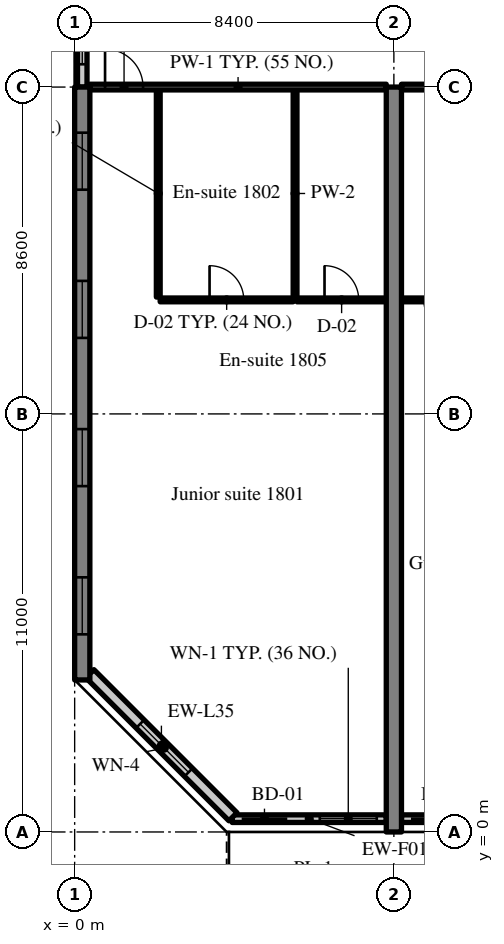
"""IFC4 building model, lengths in metres.
Left out: names, types, materials, properties, quantities, classifications, styles, units other than length and angle.
Written with IfcOpenShell. Run it as: python <this file> out.ifc"""

import sys

from ifc_helpers import new_model, si_unit, direction, frame, frame_2d, origin, place, context, subcontext, project, spatial, rectangle, extrude, source, transform, mapped, element, fill, save


model = new_model("IFC4")
c1 = context("Model", 3, precision=1e-05, world=origin(), true_north=direction((0.0, 1.0)))
c2 = subcontext(c1, "Body", "Model", "MODEL_VIEW")
j1 = project(units=[si_unit("LENGTHUNIT", "METRE"), si_unit("PLANEANGLEUNIT", "RADIAN")], contexts=[c1])
p1 = place(None, origin())
s1 = spatial("IfcSite", under=j1, at=p1, CompositionType="ELEMENT")
p2 = place(p1, origin())
s2 = spatial("IfcBuilding", under=s1, at=p2, CompositionType="ELEMENT")
p3 = place(p2, frame((0.0, 0.0, 77.2)))
s3 = spatial("IfcBuildingStorey", under=s2, at=p3, CompositionType="ELEMENT", Elevation=77.2)
m1 = source(origin(), c2, "Body", "SweptSolid", [
    extrude(rectangle(XDim=15.6, YDim=0.4, at=frame_2d((7.8, 0.0))), origin(), (0.0, 0.0, 1.0), 3.52),
])
p4 = place(p3, frame((0.2, 4.0, 0.0), z_axis=(0.0, 0.0, 1.0), x_axis=(0.0, 1.0, 0.0)))
e1 = element("IfcWall", 1, at=p4, inside=s3, PredefinedType="SHEAR", context=c2, shape_type="MappedRepresentation", body=[
    mapped(m1, transform((0.0, 0.0, 0.0), scale=1.0)),
])
m2 = source(origin(), c2, "Body", "SweptSolid", [
    extrude(rectangle(XDim=1.5, YDim=1.5, at=frame_2d((0.75, 0.75))), frame((0.0, 0.21, 0.0), z_axis=(0.0, -1.0, 0.0), x_axis=(1.0, 0.0, 0.0)), (0.0, 0.0, 1.0), 0.42),
])
p5 = place(p4, frame((1.2, 0.0, 0.9)))
e2 = element("IfcOpeningElement", 2, at=p5, cuts=e1, PredefinedType="OPENING", context=c2, shape_type="MappedRepresentation", body=[
    mapped(m2, transform((0.0, 0.0, 0.0), scale=1.0)),
])
p6 = place(p4, frame((5.1, 0.0, 0.9)))
e3 = element("IfcOpeningElement", 3, at=p6, cuts=e1, PredefinedType="OPENING", context=c2, shape_type="MappedRepresentation", body=[
    mapped(m2, transform((0.0, 0.0, 0.0), scale=1.0)),
])
p7 = place(p4, frame((9.0, 0.0, 0.9)))
e4 = element("IfcOpeningElement", 4, at=p7, cuts=e1, PredefinedType="OPENING", context=c2, shape_type="MappedRepresentation", body=[
    mapped(m2, transform((0.0, 0.0, 0.0), scale=1.0)),
])
p8 = place(p4, frame((12.9, 0.0, 0.9)))
e5 = element("IfcOpeningElement", 5, at=p8, cuts=e1, PredefinedType="OPENING", context=c2, shape_type="MappedRepresentation", body=[
    mapped(m2, transform((0.0, 0.0, 0.0), scale=1.0)),
])
m3 = source(origin(), c2, "Body", "SweptSolid", [
    extrude(rectangle(XDim=19.6, YDim=0.4, at=frame_2d((9.8, 0.0))), origin(), (0.0, 0.0, 1.0), 3.52),
])
p9 = place(p3, frame((8.4, 0.0, 0.0), z_axis=(0.0, 0.0, 1.0), x_axis=(0.0, 1.0, 0.0)))
e6 = element("IfcWall", 6, at=p9, inside=s3, PredefinedType="SHEAR", context=c2, shape_type="MappedRepresentation", body=[
    mapped(m3, transform((0.0, 0.0, 0.0), scale=1.0)),
])
m4 = source(origin(), c2, "Body", "SweptSolid", [
    extrude(rectangle(XDim=4.055, YDim=0.2, at=frame_2d((2.027, 0.0))), origin(), (0.0, 0.0, 1.0), 2.82),
])
p10 = place(p3, frame((4.145, 0.35, 0.0), z_axis=(0.0, 0.0, 1.0), x_axis=(1.0, 0.0, 0.0)))
e7 = element("IfcWall", 7, at=p10, inside=s3, PredefinedType="SOLIDWALL", context=c2, shape_type="MappedRepresentation", body=[
    mapped(m4, transform((0.0, 0.0, 0.0), scale=1.0)),
])
m5 = source(origin(), c2, "Body", "SweptSolid", [
    extrude(rectangle(XDim=1.2, YDim=2.4, at=frame_2d((0.6, 1.2))), frame((0.0, 0.11, 0.0), z_axis=(0.0, -1.0, 0.0), x_axis=(1.0, 0.0, 0.0)), (0.0, 0.0, 1.0), 0.22),
])
p11 = place(p10, frame((0.25, 0.0, 0.0)))
e8 = element("IfcOpeningElement", 8, at=p11, cuts=e7, PredefinedType="OPENING", context=c2, shape_type="MappedRepresentation", body=[
    mapped(m5, transform((0.0, 0.0, 0.0), scale=1.0)),
])
m6 = source(origin(), c2, "Body", "SweptSolid", [
    extrude(rectangle(XDim=1.5, YDim=1.5, at=frame_2d((0.75, 0.75))), frame((0.0, 0.11, 0.0), z_axis=(0.0, -1.0, 0.0), x_axis=(1.0, 0.0, 0.0)), (0.0, 0.0, 1.0), 0.22),
])
p12 = place(p10, frame((2.305, 0.0, 0.9)))
e9 = element("IfcOpeningElement", 9, at=p12, cuts=e7, PredefinedType="OPENING", context=c2, shape_type="MappedRepresentation", body=[
    mapped(m6, transform((0.0, 0.0, 0.0), scale=1.0)),
])
m7 = source(origin(), c2, "Body", "SweptSolid", [
    extrude(rectangle(XDim=3.6, YDim=0.2, at=frame_2d((1.8, 0.0))), origin(), (0.0, 0.0, 1.0), 2.82),
])
p13 = place(p3, frame((8.6, 0.35, 0.0), z_axis=(0.0, 0.0, 1.0), x_axis=(1.0, 0.0, 0.0)))
e10 = element("IfcWall", 10, at=p13, inside=s3, PredefinedType="SOLIDWALL", context=c2, shape_type="MappedRepresentation", body=[
    mapped(m7, transform((0.0, 0.0, 0.0), scale=1.0)),
])
p14 = place(p13, frame((0.25, 0.0, 0.0)))
e11 = element("IfcOpeningElement", 11, at=p14, cuts=e10, PredefinedType="OPENING", context=c2, shape_type="MappedRepresentation", body=[
    mapped(m5, transform((0.0, 0.0, 0.0), scale=1.0)),
])
p15 = place(p13, frame((1.85, 0.0, 0.9)))
e12 = element("IfcOpeningElement", 12, at=p15, cuts=e10, PredefinedType="OPENING", context=c2, shape_type="MappedRepresentation", body=[
    mapped(m6, transform((0.0, 0.0, 0.0), scale=1.0)),
])
m8 = source(origin(), c2, "Body", "SweptSolid", [
    extrude(rectangle(XDim=5.326, YDim=0.3, at=frame_2d((2.663, 0.0))), origin(), (0.0, 0.0, 1.0), 3.52),
])
p16 = place(p3, frame((0.4, 4.166, 0.0), z_axis=(0.0, 0.0, 1.0), x_axis=(0.707106781187, -0.707106781187, 0.0)))
e13 = element("IfcWall", 13, at=p16, inside=s3, PredefinedType="SOLIDWALL", context=c2, shape_type="MappedRepresentation", body=[
    mapped(m8, transform((0.0, 0.0, 0.0), scale=1.0)),
])
m9 = source(origin(), c2, "Body", "SweptSolid", [
    extrude(rectangle(XDim=1.8, YDim=1.5, at=frame_2d((0.9, 0.75))), frame((0.0, 0.16, 0.0), z_axis=(0.0, -1.0, 0.0), x_axis=(1.0, 0.0, 0.0)), (0.0, 0.0, 1.0), 0.32),
])
p17 = place(p16, frame((1.871, 0.0, 0.9)))
e14 = element("IfcOpeningElement", 14, at=p17, cuts=e13, PredefinedType="OPENING", context=c2, shape_type="MappedRepresentation", body=[
    mapped(m9, transform((0.0, 0.0, 0.0), scale=1.0)),
])
m10 = source(origin(), c2, "Body", "SweptSolid", [
    extrude(rectangle(XDim=2.4, YDim=0.25, at=frame_2d((1.2, 0.0))), origin(), (0.0, 0.0, 1.0), 2.62),
])
p18 = place(p3, frame((0.2, 19.6, 0.0), z_axis=(0.0, 0.0, 1.0), x_axis=(0.0, 1.0, 0.0)))
e15 = element("IfcWall", 15, at=p18, inside=s3, PredefinedType="SOLIDWALL", context=c2, shape_type="MappedRepresentation", body=[
    mapped(m10, transform((0.0, 0.0, 0.0), scale=1.0)),
])
m11 = source(origin(), c2, "Body", "SweptSolid", [
    extrude(rectangle(XDim=1.2, YDim=1.5, at=frame_2d((0.6, 0.75))), frame((0.0, 0.135, 0.0), z_axis=(0.0, -1.0, 0.0), x_axis=(1.0, 0.0, 0.0)), (0.0, 0.0, 1.0), 0.27),
])
p19 = place(p18, frame((0.6, 0.0, 0.9)))
e16 = element("IfcOpeningElement", 16, at=p19, cuts=e15, PredefinedType="OPENING", context=c2, shape_type="MappedRepresentation", body=[
    mapped(m11, transform((0.0, 0.0, 0.0), scale=1.0)),
])
m12 = source(origin(), c2, "Body", "SweptSolid", [
    extrude(rectangle(XDim=5.45, YDim=0.1, at=frame_2d((2.725, 0.0))), origin(), (0.0, 0.0, 1.0), 3.52),
])
for number, where, z_axis, x_axis in (
    (17, (2.2, 14.075, 0.0), (0.0, 0.0, 1.0), (0.0, 1.0, 0.0)),
    (18, (5.8, 14.075, 0.0), (0.0, 0.0, 1.0), (0.0, 1.0, 0.0)),
):
    element("IfcWall", number, at=place(p3, frame(where, z_axis=z_axis, x_axis=x_axis)), inside=s3, PredefinedType="PARTITIONING", context=c2, shape_type="MappedRepresentation", body=[
        mapped(m12, transform((0.0, 0.0, 0.0), scale=1.0)),
    ])
m13 = source(origin(), c2, "Body", "SweptSolid", [
    extrude(rectangle(XDim=3.5, YDim=0.1, at=frame_2d((1.75, 0.0))), origin(), (0.0, 0.0, 1.0), 3.52),
])
p20 = place(p3, frame((2.25, 14.0, 0.0), z_axis=(0.0, 0.0, 1.0), x_axis=(1.0, 0.0, 0.0)))
e19 = element("IfcWall", 19, at=p20, inside=s3, PredefinedType="PARTITIONING", context=c2, shape_type="MappedRepresentation", body=[
    mapped(m13, transform((0.0, 0.0, 0.0), scale=1.0)),
])
m14 = source(origin(), c2, "Body", "SweptSolid", [
    extrude(rectangle(XDim=0.9, YDim=2.1, at=frame_2d((0.45, 1.05))), frame((0.0, 0.06, 0.0), z_axis=(0.0, -1.0, 0.0), x_axis=(1.0, 0.0, 0.0)), (0.0, 0.0, 1.0), 0.12),
])
p21 = place(p20, frame((1.3, 0.0, 0.0)))
e20 = element("IfcOpeningElement", 20, at=p21, cuts=e19, PredefinedType="OPENING", context=c2, shape_type="MappedRepresentation", body=[
    mapped(m14, transform((0.0, 0.0, 0.0), scale=1.0)),
])
m15 = source(origin(), c2, "Body", "SweptSolid", [
    extrude(rectangle(XDim=2.35, YDim=0.1, at=frame_2d((1.175, 0.0))), origin(), (0.0, 0.0, 1.0), 3.52),
])
p22 = place(p3, frame((5.85, 14.0, 0.0), z_axis=(0.0, 0.0, 1.0), x_axis=(1.0, 0.0, 0.0)))
e21 = element("IfcWall", 21, at=p22, inside=s3, PredefinedType="PARTITIONING", context=c2, shape_type="MappedRepresentation", body=[
    mapped(m15, transform((0.0, 0.0, 0.0), scale=1.0)),
])
p23 = place(p22, frame((0.725, 0.0, 0.0)))
e22 = element("IfcOpeningElement", 22, at=p23, cuts=e21, PredefinedType="OPENING", context=c2, shape_type="MappedRepresentation", body=[
    mapped(m14, transform((0.0, 0.0, 0.0), scale=1.0)),
])
m16 = source(origin(), c2, "Body", "SweptSolid", [
    extrude(rectangle(XDim=7.8, YDim=0.15, at=frame_2d((3.9, 0.0))), origin(), (0.0, 0.0, 1.0), 2.82),
])
p24 = place(p3, frame((0.4, 19.6, 0.0), z_axis=(0.0, 0.0, 1.0), x_axis=(1.0, 0.0, 0.0)))
e23 = element("IfcWall", 23, at=p24, inside=s3, PredefinedType="PARTITIONING", context=c2, shape_type="MappedRepresentation", body=[
    mapped(m16, transform((0.0, 0.0, 0.0), scale=1.0)),
])
m17 = source(origin(), c2, "Body", "SweptSolid", [
    extrude(rectangle(XDim=1.0, YDim=2.1, at=frame_2d((0.5, 1.05))), frame((0.0, 0.085, 0.0), z_axis=(0.0, -1.0, 0.0), x_axis=(1.0, 0.0, 0.0)), (0.0, 0.0, 1.0), 0.17),
])
p25 = place(p24, frame((0.4, 0.0, 0.0)))
e24 = element("IfcOpeningElement", 24, at=p25, cuts=e23, PredefinedType="OPENING", context=c2, shape_type="MappedRepresentation", body=[
    mapped(m17, transform((0.0, 0.0, 0.0), scale=1.0)),
])
m18 = source(origin(), c2, "Body", "SweptSolid", [
    extrude(rectangle(XDim=2.075, YDim=0.1, at=frame_2d((1.038, 0.0))), origin(), (0.0, 0.0, 1.0), 3.52),
])
p26 = place(p3, frame((8.6, 14.0, 0.0), z_axis=(0.0, 0.0, 1.0), x_axis=(1.0, 0.0, 0.0)))
e25 = element("IfcWall", 25, at=p26, inside=s3, PredefinedType="PARTITIONING", context=c2, shape_type="MappedRepresentation", body=[
    mapped(m18, transform((0.0, 0.0, 0.0), scale=1.0)),
])
p27 = place(p26, frame((0.588, 0.0, 0.0)))
e26 = element("IfcOpeningElement", 26, at=p27, cuts=e25, PredefinedType="OPENING", context=c2, shape_type="MappedRepresentation", body=[
    mapped(m14, transform((0.0, 0.0, 0.0), scale=1.0)),
])
m19 = source(origin(), c2, "Body", "SweptSolid", [
    extrude(rectangle(XDim=3.925, YDim=0.15, at=frame_2d((1.962, 0.0))), origin(), (0.0, 0.0, 1.0), 2.82),
])
p28 = place(p3, frame((8.6, 19.6, 0.0), z_axis=(0.0, 0.0, 1.0), x_axis=(1.0, 0.0, 0.0)))
e27 = element("IfcWall", 27, at=p28, inside=s3, PredefinedType="PARTITIONING", context=c2, shape_type="MappedRepresentation", body=[
    mapped(m19, transform((0.0, 0.0, 0.0), scale=1.0)),
])
p29 = place(p28, frame((2.525, 0.0, 0.0)))
e28 = element("IfcOpeningElement", 28, at=p29, cuts=e27, PredefinedType="OPENING", context=c2, shape_type="MappedRepresentation", body=[
    mapped(m17, transform((0.0, 0.0, 0.0), scale=1.0)),
])
m20 = source(origin(), c2, "Body", "SweptSolid", [
    extrude(rectangle(XDim=1.2, YDim=2.4, at=frame_2d((0.6, 1.2))), frame((0.0, 0.025, 0.0), z_axis=(0.0, -1.0, 0.0), x_axis=(1.0, 0.0, 0.0)), (0.0, 0.0, 1.0), 0.05),
])
p30 = place(p11, origin())
e29 = element("IfcDoor", 29, at=p30, inside=s3, OperationType="SLIDING_TO_LEFT", PredefinedType="DOOR", context=c2, shape_type="MappedRepresentation", body=[
    mapped(m20, transform((0.0, 0.0, 0.0), scale=1.0)),
])
fill(e8, e29)
m21 = source(origin(), c2, "Body", "SweptSolid", [
    extrude(rectangle(XDim=1.5, YDim=1.5, at=frame_2d((0.75, 0.75))), frame((0.0, 0.03, 0.0), z_axis=(0.0, -1.0, 0.0), x_axis=(1.0, 0.0, 0.0)), (0.0, 0.0, 1.0), 0.06),
])
p31 = place(p12, origin())
e30 = element("IfcWindow", 30, at=p31, inside=s3, PartitioningType="SINGLE_PANEL", PredefinedType="WINDOW", context=c2, shape_type="MappedRepresentation", body=[
    mapped(m21, transform((0.0, 0.0, 0.0), scale=1.0)),
])
fill(e9, e30)
p32 = place(p14, origin())
e31 = element("IfcDoor", 31, at=p32, inside=s3, OperationType="SLIDING_TO_RIGHT", PredefinedType="DOOR", context=c2, shape_type="MappedRepresentation", body=[
    mapped(m20, transform((0.0, 0.0, 0.0), scale=1.0)),
])
fill(e11, e31)
m22 = source(origin(), c2, "Body", "SweptSolid", [
    extrude(rectangle(XDim=1.8, YDim=1.5, at=frame_2d((0.9, 0.75))), frame((0.0, 0.03, 0.0), z_axis=(0.0, -1.0, 0.0), x_axis=(1.0, 0.0, 0.0)), (0.0, 0.0, 1.0), 0.06),
])
p33 = place(p17, origin())
e32 = element("IfcWindow", 32, at=p33, inside=s3, PartitioningType="SINGLE_PANEL", PredefinedType="WINDOW", context=c2, shape_type="MappedRepresentation", body=[
    mapped(m22, transform((0.0, 0.0, 0.0), scale=1.0)),
])
fill(e14, e32)
p34 = place(p5, origin())
e33 = element("IfcWindow", 33, at=p34, inside=s3, PartitioningType="SINGLE_PANEL", PredefinedType="WINDOW", context=c2, shape_type="MappedRepresentation", body=[
    mapped(m21, transform((0.0, 0.0, 0.0), scale=1.0)),
])
fill(e2, e33)
p35 = place(p6, origin())
e34 = element("IfcWindow", 34, at=p35, inside=s3, PartitioningType="SINGLE_PANEL", PredefinedType="WINDOW", context=c2, shape_type="MappedRepresentation", body=[
    mapped(m21, transform((0.0, 0.0, 0.0), scale=1.0)),
])
fill(e3, e34)
p36 = place(p7, origin())
e35 = element("IfcWindow", 35, at=p36, inside=s3, PartitioningType="SINGLE_PANEL", PredefinedType="WINDOW", context=c2, shape_type="MappedRepresentation", body=[
    mapped(m21, transform((0.0, 0.0, 0.0), scale=1.0)),
])
fill(e4, e35)
p37 = place(p8, origin())
e36 = element("IfcWindow", 36, at=p37, inside=s3, PartitioningType="SINGLE_PANEL", PredefinedType="WINDOW", context=c2, shape_type="MappedRepresentation", body=[
    mapped(m21, transform((0.0, 0.0, 0.0), scale=1.0)),
])
fill(e5, e36)
m23 = source(origin(), c2, "Body", "SweptSolid", [
    extrude(rectangle(XDim=1.2, YDim=1.5, at=frame_2d((0.6, 0.75))), frame((0.0, 0.03, 0.0), z_axis=(0.0, -1.0, 0.0), x_axis=(1.0, 0.0, 0.0)), (0.0, 0.0, 1.0), 0.06),
])
p38 = place(p19, origin())
e37 = element("IfcWindow", 37, at=p38, inside=s3, PartitioningType="SINGLE_PANEL", PredefinedType="WINDOW", context=c2, shape_type="MappedRepresentation", body=[
    mapped(m23, transform((0.0, 0.0, 0.0), scale=1.0)),
])
fill(e16, e37)
m24 = source(origin(), c2, "Body", "SweptSolid", [
    extrude(rectangle(XDim=0.9, YDim=2.1, at=frame_2d((0.45, 1.05))), frame((0.0, 0.025, 0.0), z_axis=(0.0, -1.0, 0.0), x_axis=(1.0, 0.0, 0.0)), (0.0, 0.0, 1.0), 0.05),
])
p39 = place(p21, origin())
e38 = element("IfcDoor", 38, at=p39, inside=s3, OperationType="SINGLE_SWING_LEFT", PredefinedType="DOOR", context=c2, shape_type="MappedRepresentation", body=[
    mapped(m24, transform((0.0, 0.0, 0.0), scale=1.0)),
])
fill(e20, e38)
p40 = place(p23, origin())
e39 = element("IfcDoor", 39, at=p40, inside=s3, OperationType="SINGLE_SWING_LEFT", PredefinedType="DOOR", context=c2, shape_type="MappedRepresentation", body=[
    mapped(m24, transform((0.0, 0.0, 0.0), scale=1.0)),
])
fill(e22, e39)
m25 = source(origin(), c2, "Body", "SweptSolid", [
    extrude(rectangle(XDim=1.0, YDim=2.1, at=frame_2d((0.5, 1.05))), frame((0.0, 0.025, 0.0), z_axis=(0.0, -1.0, 0.0), x_axis=(1.0, 0.0, 0.0)), (0.0, 0.0, 1.0), 0.05),
])
p41 = place(p25, origin())
e40 = element("IfcDoor", 40, at=p41, inside=s3, OperationType="SINGLE_SWING_LEFT", PredefinedType="DOOR", context=c2, shape_type="MappedRepresentation", body=[
    mapped(m25, transform((0.0, 0.0, 0.0), scale=1.0)),
])
fill(e24, e40)
p42 = place(p27, origin())
e41 = element("IfcDoor", 41, at=p42, inside=s3, OperationType="SINGLE_SWING_RIGHT", PredefinedType="DOOR", context=c2, shape_type="MappedRepresentation", body=[
    mapped(m24, transform((0.0, 0.0, 0.0), scale=1.0)),
])
fill(e26, e41)
save(model, sys.argv[1])
